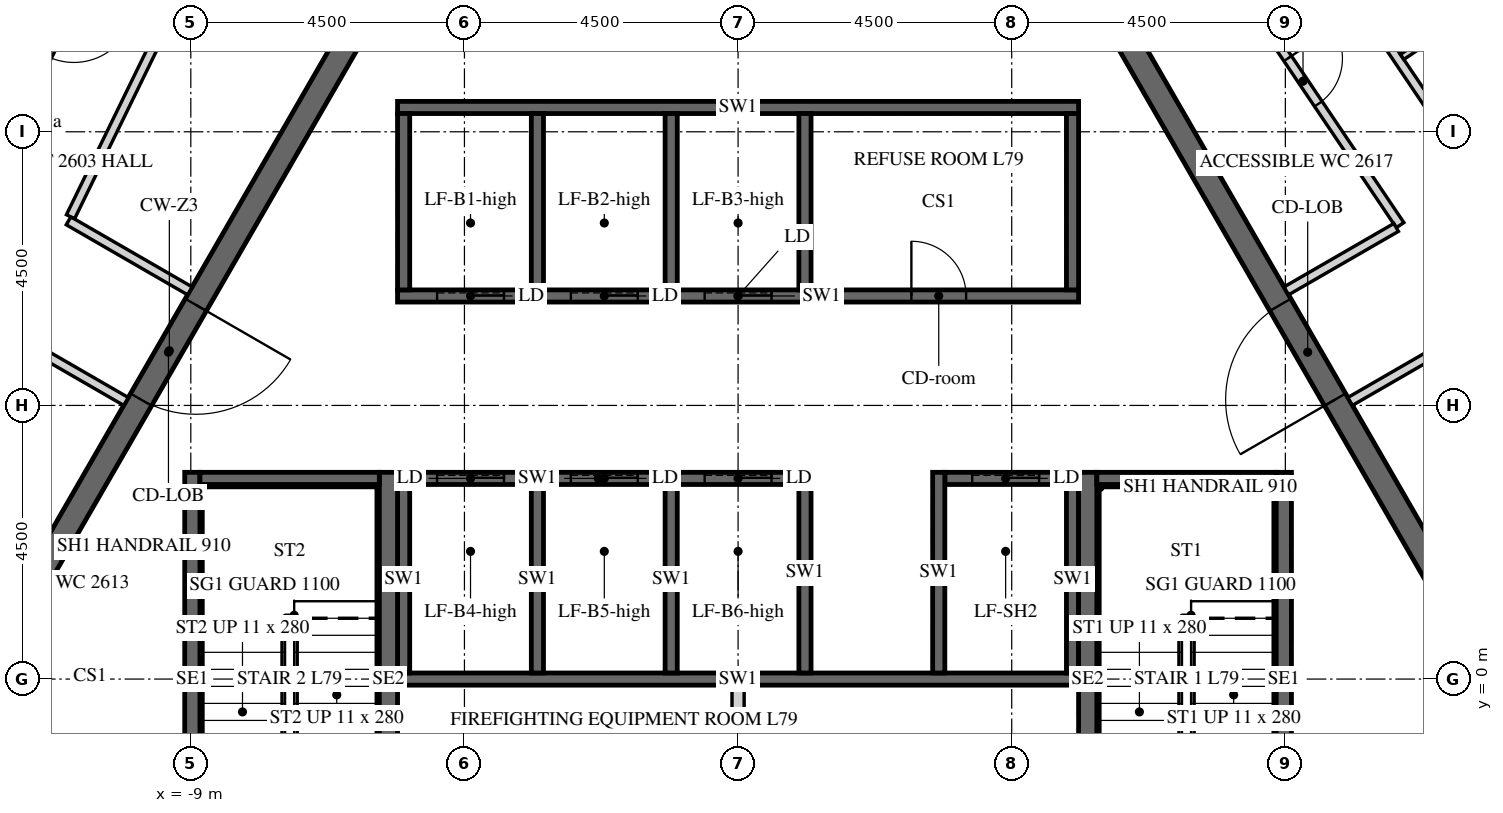
"""IFC4 building model, lengths in metres.
Left out: names, types, materials, properties, quantities, classifications, styles, units other than length and angle.
Written with IfcOpenShell. Run it as: python <this file> out.ifc"""

import sys

from ifc_helpers import new_model, si_unit, direction, frame, frame_2d, origin, place, context, subcontext, project, spatial, polyline, rectangle, outline, extrude, element, fill, save


model = new_model("IFC4")
c1 = context("Model", 3, precision=1e-05, world=origin(), true_north=direction((0.0, 1.0)))
c2 = subcontext(c1, "Body", "Model", "MODEL_VIEW")
j1 = project(units=[si_unit("LENGTHUNIT", "METRE"), si_unit("PLANEANGLEUNIT", "RADIAN")], contexts=[c1])
p1 = place(None, origin())
s1 = spatial("IfcSite", under=j1, at=p1, CompositionType="ELEMENT")
p2 = place(p1, origin())
s2 = spatial("IfcBuilding", under=s1, at=p2, CompositionType="ELEMENT")
p3 = place(p2, frame((0.0, 0.0, 326.4)))
s3 = spatial("IfcBuildingStorey", under=s2, at=p3, CompositionType="ELEMENT", Elevation=326.4)
p4 = place(p3, frame((-6.235, 10.8, -0.15), z_axis=(0.0, 0.0, 1.0), x_axis=(-0.499996419489, -0.866027470984, 0.0)))
e1 = element("IfcWall", 1, at=p4, inside=s3, PredefinedType="SHEAR", context=c2, shape_type="SweptSolid", body=[
    extrude(outline(polyline([(-0.115, -0.2), (12.586, -0.2), (12.355, 0.2), (0.115, 0.2), (-0.115, -0.2)])), origin(), (0.0, 0.0, 1.0), 3.9),
])
p5 = place(p4, frame((5.364, 0.0, 0.15)))
e2 = element("IfcOpeningElement", 2, at=p5, cuts=e1, PredefinedType="OPENING", context=c2, shape_type="SweptSolid", body=[
    extrude(rectangle(XDim=1.8, YDim=2.4, at=frame_2d((0.9, 1.2))), frame((0.0, 0.21, 0.0), z_axis=(0.0, -1.0, 0.0), x_axis=(1.0, 0.0, 0.0)), (0.0, 0.0, 1.0), 0.42),
])
p6 = place(p3, frame((-12.471, 0.0, -0.15), z_axis=(0.0, 0.0, 1.0), x_axis=(0.499996419489, -0.866027470984, 0.0)))
e3 = element("IfcWall", 3, at=p6, inside=s3, PredefinedType="SHEAR", context=c2, shape_type="SweptSolid", body=[
    extrude(outline(polyline([(-0.115, -0.2), (12.586, -0.2), (12.355, 0.2), (0.115, 0.2), (-0.115, -0.2)])), origin(), (0.0, 0.0, 1.0), 3.9),
])
p7 = place(p6, frame((5.306, 0.0, 0.15)))
e4 = element("IfcOpeningElement", 4, at=p7, cuts=e3, PredefinedType="OPENING", context=c2, shape_type="SweptSolid", body=[
    extrude(rectangle(XDim=1.8, YDim=2.4, at=frame_2d((0.9, 1.2))), frame((0.0, 0.21, 0.0), z_axis=(0.0, -1.0, 0.0), x_axis=(1.0, 0.0, 0.0)), (0.0, 0.0, 1.0), 0.42),
])
p8 = place(p3, frame((6.235, -10.8, -0.15), z_axis=(0.0, 0.0, 1.0), x_axis=(0.499996419489, 0.866027470984, 0.0)))
e5 = element("IfcWall", 5, at=p8, inside=s3, PredefinedType="SHEAR", context=c2, shape_type="SweptSolid", body=[
    extrude(outline(polyline([(-0.115, -0.2), (12.586, -0.2), (12.355, 0.2), (0.115, 0.2), (-0.115, -0.2)])), origin(), (0.0, 0.0, 1.0), 3.9),
])
p9 = place(p8, frame((5.364, 0.0, 0.15)))
e6 = element("IfcOpeningElement", 6, at=p9, cuts=e5, PredefinedType="OPENING", context=c2, shape_type="SweptSolid", body=[
    extrude(rectangle(XDim=1.8, YDim=2.4, at=frame_2d((0.9, 1.2))), frame((0.0, 0.21, 0.0), z_axis=(0.0, -1.0, 0.0), x_axis=(1.0, 0.0, 0.0)), (0.0, 0.0, 1.0), 0.42),
])
p10 = place(p3, frame((12.471, 0.0, -0.15), z_axis=(0.0, 0.0, 1.0), x_axis=(-0.499996419489, 0.866027470984, 0.0)))
e7 = element("IfcWall", 7, at=p10, inside=s3, PredefinedType="SHEAR", context=c2, shape_type="SweptSolid", body=[
    extrude(outline(polyline([(-0.115, -0.2), (12.586, -0.2), (12.355, 0.2), (0.115, 0.2), (-0.115, -0.2)])), origin(), (0.0, 0.0, 1.0), 3.9),
])
p11 = place(p10, frame((5.306, 0.0, 0.15)))
e8 = element("IfcOpeningElement", 8, at=p11, cuts=e7, PredefinedType="OPENING", context=c2, shape_type="SweptSolid", body=[
    extrude(rectangle(XDim=1.8, YDim=2.4, at=frame_2d((0.9, 1.2))), frame((0.0, 0.21, 0.0), z_axis=(0.0, -1.0, 0.0), x_axis=(1.0, 0.0, 0.0)), (0.0, 0.0, 1.0), 0.42),
])
p12 = place(p3, frame((-5.6, 6.3, -0.25), z_axis=(0.0, 0.0, 1.0), x_axis=(1.0, 0.0, 0.0)))
e9 = element("IfcWall", 9, at=p12, inside=s3, PredefinedType="SHEAR", context=c2, shape_type="SweptSolid", body=[
    extrude(rectangle(XDim=11.2, YDim=0.2, at=frame_2d((5.6, 0.0))), origin(), (0.0, 0.0, 1.0), 3.9),
])
p13 = place(p12, frame((8.45, 0.0, 0.25)))
e10 = element("IfcOpeningElement", 10, at=p13, cuts=e9, PredefinedType="OPENING", context=c2, shape_type="SweptSolid", body=[
    extrude(rectangle(XDim=0.9, YDim=2.1, at=frame_2d((0.45, 1.05))), frame((0.0, 0.11, 0.0), z_axis=(0.0, -1.0, 0.0), x_axis=(1.0, 0.0, 0.0)), (0.0, 0.0, 1.0), 0.22),
])
p14 = place(p12, frame((0.65, 0.0, 0.25)))
e11 = element("IfcOpeningElement", 11, at=p14, cuts=e9, PredefinedType="OPENING", context=c2, shape_type="SweptSolid", body=[
    extrude(rectangle(XDim=1.1, YDim=2.1, at=frame_2d((0.55, 1.05))), frame((0.0, 0.11, 0.0), z_axis=(0.0, -1.0, 0.0), x_axis=(1.0, 0.0, 0.0)), (0.0, 0.0, 1.0), 0.22),
])
p15 = place(p12, frame((2.85, 0.0, 0.25)))
e12 = element("IfcOpeningElement", 12, at=p15, cuts=e9, PredefinedType="OPENING", context=c2, shape_type="SweptSolid", body=[
    extrude(rectangle(XDim=1.1, YDim=2.1, at=frame_2d((0.55, 1.05))), frame((0.0, 0.11, 0.0), z_axis=(0.0, -1.0, 0.0), x_axis=(1.0, 0.0, 0.0)), (0.0, 0.0, 1.0), 0.22),
])
p16 = place(p12, frame((5.05, 0.0, 0.25)))
e13 = element("IfcOpeningElement", 13, at=p16, cuts=e9, PredefinedType="OPENING", context=c2, shape_type="SweptSolid", body=[
    extrude(rectangle(XDim=1.1, YDim=2.1, at=frame_2d((0.55, 1.05))), frame((0.0, 0.11, 0.0), z_axis=(0.0, -1.0, 0.0), x_axis=(1.0, 0.0, 0.0)), (0.0, 0.0, 1.0), 0.22),
])
p17 = place(p3, frame((-5.6, 9.4, -0.25), z_axis=(0.0, 0.0, 1.0), x_axis=(1.0, 0.0, 0.0)))
e14 = element("IfcWall", 14, at=p17, inside=s3, PredefinedType="SHEAR", context=c2, shape_type="SweptSolid", body=[
    extrude(rectangle(XDim=11.2, YDim=0.2, at=frame_2d((5.6, 0.0))), origin(), (0.0, 0.0, 1.0), 3.9),
])
for number, where, z_axis, x_axis in (
    (15, (-5.5, 6.4, -0.25), (0.0, 0.0, 1.0), (0.0, 1.0, 0.0)),
    (16, (-3.3, 6.4, -0.25), (0.0, 0.0, 1.0), (0.0, 1.0, 0.0)),
    (17, (-1.1, 6.4, -0.25), (0.0, 0.0, 1.0), (0.0, 1.0, 0.0)),
    (18, (1.1, 6.4, -0.25), (0.0, 0.0, 1.0), (0.0, 1.0, 0.0)),
    (19, (5.5, 6.4, -0.25), (0.0, 0.0, 1.0), (0.0, 1.0, 0.0)),
):
    element("IfcWall", number, at=place(p3, frame(where, z_axis=z_axis, x_axis=x_axis)), inside=s3, PredefinedType="SHEAR", context=c2, shape_type="SweptSolid", body=[
        extrude(rectangle(XDim=2.9, YDim=0.2, at=frame_2d((1.45, 0.0))), origin(), (0.0, 0.0, 1.0), 3.9),
    ])
p18 = place(p3, frame((-5.6, 3.3, -0.25), z_axis=(0.0, 0.0, 1.0), x_axis=(1.0, 0.0, 0.0)))
e20 = element("IfcWall", 20, at=p18, inside=s3, PredefinedType="SHEAR", context=c2, shape_type="SweptSolid", body=[
    extrude(rectangle(XDim=6.6, YDim=0.2, at=frame_2d((3.3, 0.0))), origin(), (0.0, 0.0, 1.0), 3.9),
])
p19 = place(p18, frame((0.65, 0.0, 0.25)))
e21 = element("IfcOpeningElement", 21, at=p19, cuts=e20, PredefinedType="OPENING", context=c2, shape_type="SweptSolid", body=[
    extrude(rectangle(XDim=1.1, YDim=2.1, at=frame_2d((0.55, 1.05))), frame((0.0, 0.11, 0.0), z_axis=(0.0, -1.0, 0.0), x_axis=(1.0, 0.0, 0.0)), (0.0, 0.0, 1.0), 0.22),
])
p20 = place(p18, frame((2.85, 0.0, 0.25)))
e22 = element("IfcOpeningElement", 22, at=p20, cuts=e20, PredefinedType="OPENING", context=c2, shape_type="SweptSolid", body=[
    extrude(rectangle(XDim=1.1, YDim=2.1, at=frame_2d((0.55, 1.05))), frame((0.0, 0.11, 0.0), z_axis=(0.0, -1.0, 0.0), x_axis=(1.0, 0.0, 0.0)), (0.0, 0.0, 1.0), 0.22),
])
p21 = place(p18, frame((5.05, 0.0, 0.25)))
e23 = element("IfcOpeningElement", 23, at=p21, cuts=e20, PredefinedType="OPENING", context=c2, shape_type="SweptSolid", body=[
    extrude(rectangle(XDim=1.1, YDim=2.1, at=frame_2d((0.55, 1.05))), frame((0.0, 0.11, 0.0), z_axis=(0.0, -1.0, 0.0), x_axis=(1.0, 0.0, 0.0)), (0.0, 0.0, 1.0), 0.22),
])
p22 = place(p3, frame((3.4, 3.3, -0.25), z_axis=(0.0, 0.0, 1.0), x_axis=(1.0, 0.0, 0.0)))
e24 = element("IfcWall", 24, at=p22, inside=s3, PredefinedType="SHEAR", context=c2, shape_type="SweptSolid", body=[
    extrude(rectangle(XDim=2.2, YDim=0.2, at=frame_2d((1.1, 0.0))), origin(), (0.0, 0.0, 1.0), 3.9),
])
p23 = place(p22, frame((0.45, 0.0, 0.25)))
e25 = element("IfcOpeningElement", 25, at=p23, cuts=e24, PredefinedType="OPENING", context=c2, shape_type="SweptSolid", body=[
    extrude(rectangle(XDim=1.1, YDim=2.1, at=frame_2d((0.55, 1.05))), frame((0.0, 0.11, 0.0), z_axis=(0.0, -1.0, 0.0), x_axis=(1.0, 0.0, 0.0)), (0.0, 0.0, 1.0), 0.22),
])
p24 = place(p3, frame((-5.6, 0.0, -0.25), z_axis=(0.0, 0.0, 1.0), x_axis=(1.0, 0.0, 0.0)))
e26 = element("IfcWall", 26, at=p24, inside=s3, PredefinedType="SHEAR", context=c2, shape_type="SweptSolid", body=[
    extrude(rectangle(XDim=11.2, YDim=0.2, at=frame_2d((5.6, 0.0))), origin(), (0.0, 0.0, 1.0), 3.9),
])
for number, where, z_axis, x_axis in (
    (27, (-5.5, 0.1, -0.25), (0.0, 0.0, 1.0), (0.0, 1.0, 0.0)),
    (28, (-3.3, 0.1, -0.25), (0.0, 0.0, 1.0), (0.0, 1.0, 0.0)),
    (29, (-1.1, 0.1, -0.25), (0.0, 0.0, 1.0), (0.0, 1.0, 0.0)),
):
    element("IfcWall", number, at=place(p3, frame(where, z_axis=z_axis, x_axis=x_axis)), inside=s3, PredefinedType="SHEAR", context=c2, shape_type="SweptSolid", body=[
        extrude(rectangle(XDim=3.1, YDim=0.2, at=frame_2d((1.55, 0.0))), origin(), (0.0, 0.0, 1.0), 3.9),
    ])
for number, where, z_axis, x_axis in (
    (30, (1.1, 0.1, -0.25), (0.0, 0.0, 1.0), (0.0, 1.0, 0.0)),
    (31, (3.3, 0.1, -0.25), (0.0, 0.0, 1.0), (0.0, 1.0, 0.0)),
):
    element("IfcWall", number, at=place(p3, frame(where, z_axis=z_axis, x_axis=x_axis)), inside=s3, PredefinedType="SHEAR", context=c2, shape_type="SweptSolid", body=[
        extrude(rectangle(XDim=3.3, YDim=0.2, at=frame_2d((1.65, 0.0))), origin(), (0.0, 0.0, 1.0), 3.9),
    ])
p25 = place(p3, frame((5.5, 0.1, -0.25), z_axis=(0.0, 0.0, 1.0), x_axis=(0.0, 1.0, 0.0)))
e32 = element("IfcWall", 32, at=p25, inside=s3, PredefinedType="SHEAR", context=c2, shape_type="SweptSolid", body=[
    extrude(rectangle(XDim=3.1, YDim=0.2, at=frame_2d((1.55, 0.0))), origin(), (0.0, 0.0, 1.0), 3.9),
])
p26 = place(p3, frame((0.0, -6.2, 0.0), z_axis=(0.0, 0.0, 1.0), x_axis=(0.0, 1.0, 0.0)))
e33 = element("IfcWall", 33, at=p26, inside=s3, PredefinedType="PARTITIONING", context=c2, shape_type="SweptSolid", body=[
    extrude(rectangle(XDim=6.1, YDim=0.2, at=frame_2d((3.05, 0.0))), origin(), (0.0, 0.0, 1.0), 3.65),
])
p27 = place(p3, frame((5.75, -3.4, -0.25), z_axis=(0.0, 0.0, 1.0), x_axis=(0.0, 1.0, 0.0)))
e34 = element("IfcWall", 34, at=p27, inside=s3, PredefinedType="SHEAR", context=c2, shape_type="SweptSolid", body=[
    extrude(rectangle(XDim=6.8, YDim=0.3, at=frame_2d((3.4, 0.0))), origin(), (0.0, 0.0, 1.0), 3.9),
])
p28 = place(p3, frame((8.975, -3.4, -0.25), z_axis=(0.0, 0.0, 1.0), x_axis=(0.0, 1.0, 0.0)))
e35 = element("IfcWall", 35, at=p28, inside=s3, PredefinedType="SHEAR", context=c2, shape_type="SweptSolid", body=[
    extrude(rectangle(XDim=6.8, YDim=0.25, at=frame_2d((3.4, 0.0))), origin(), (0.0, 0.0, 1.0), 3.9),
])
p29 = place(p3, frame((5.9, 3.3, -0.25), z_axis=(0.0, 0.0, 1.0), x_axis=(1.0, 0.0, 0.0)))
e36 = element("IfcWall", 36, at=p29, inside=s3, PredefinedType="SHEAR", context=c2, shape_type="SweptSolid", body=[
    extrude(rectangle(XDim=2.95, YDim=0.2, at=frame_2d((1.475, 0.0))), origin(), (0.0, 0.0, 1.0), 3.9),
])
p30 = place(p3, frame((-5.75, -3.4, -0.25), z_axis=(0.0, 0.0, 1.0), x_axis=(0.0, 1.0, 0.0)))
e37 = element("IfcWall", 37, at=p30, inside=s3, PredefinedType="SHEAR", context=c2, shape_type="SweptSolid", body=[
    extrude(rectangle(XDim=6.8, YDim=0.3, at=frame_2d((3.4, 0.0))), origin(), (0.0, 0.0, 1.0), 3.9),
])
p31 = place(p3, frame((-8.975, -3.4, -0.25), z_axis=(0.0, 0.0, 1.0), x_axis=(0.0, 1.0, 0.0)))
e38 = element("IfcWall", 38, at=p31, inside=s3, PredefinedType="SHEAR", context=c2, shape_type="SweptSolid", body=[
    extrude(rectangle(XDim=6.8, YDim=0.25, at=frame_2d((3.4, 0.0))), origin(), (0.0, 0.0, 1.0), 3.9),
])
p32 = place(p3, frame((-8.85, 3.3, -0.25), z_axis=(0.0, 0.0, 1.0), x_axis=(1.0, 0.0, 0.0)))
e39 = element("IfcWall", 39, at=p32, inside=s3, PredefinedType="SHEAR", context=c2, shape_type="SweptSolid", body=[
    extrude(rectangle(XDim=2.95, YDim=0.2, at=frame_2d((1.475, 0.0))), origin(), (0.0, 0.0, 1.0), 3.9),
])
p33 = place(p3, frame((-8.247, 16.625, 0.0), z_axis=(0.0, 0.0, 1.0), x_axis=(-0.438376416131, -0.89879147625, 0.0)))
e40 = element("IfcWall", 40, at=p33, inside=s3, PredefinedType="PARTITIONING", context=c2, shape_type="SweptSolid", body=[
    extrude(rectangle(XDim=16.606, YDim=0.15, at=frame_2d((8.303, 0.0))), origin(), (0.0, 0.0, 1.0), 2.838),
])
p34 = place(p33, frame((6.103, 0.0, 0.0)))
e41 = element("IfcOpeningElement", 41, at=p34, cuts=e40, PredefinedType="OPENING", context=c2, shape_type="SweptSolid", body=[
    extrude(rectangle(XDim=1.0, YDim=2.1, at=frame_2d((0.5, 1.05))), frame((0.0, 0.085, 0.0), z_axis=(0.0, -1.0, 0.0), x_axis=(1.0, 0.0, 0.0)), (0.0, 0.0, 1.0), 0.17),
])
p35 = place(p3, frame((-9.016, 6.384, 0.0), z_axis=(0.0, 0.0, 1.0), x_axis=(-0.866030286288, 0.49999154316, 0.0)))
e42 = element("IfcWall", 42, at=p35, inside=s3, PredefinedType="PARTITIONING", context=c2, shape_type="SweptSolid", body=[
    extrude(rectangle(XDim=2.304, YDim=0.15, at=frame_2d((1.152, 0.0))), origin(), (0.0, 0.0, 1.0), 2.838),
])
p36 = place(p3, frame((-10.978, 7.604, 0.0), z_axis=(0.0, 0.0, 1.0), x_axis=(0.43838720727, 0.898786212902, 0.0)))
e43 = element("IfcWall", 43, at=p36, inside=s3, PredefinedType="PARTITIONING", context=c2, shape_type="SweptSolid", body=[
    extrude(rectangle(XDim=8.452, YDim=0.15, at=frame_2d((4.226, 0.0))), origin(), (0.0, 0.0, 1.0), 2.838),
])
p37 = place(p3, frame((-11.868, 5.606, 0.0), z_axis=(0.0, 0.0, 1.0), x_axis=(0.866033244403, -0.499986419405, 0.0)))
e44 = element("IfcWall", 44, at=p37, inside=s3, PredefinedType="PARTITIONING", context=c2, shape_type="SweptSolid", body=[
    extrude(rectangle(XDim=2.082, YDim=0.15, at=frame_2d((1.041, 0.0))), origin(), (0.0, 0.0, 1.0), 2.838),
])
p38 = place(p3, frame((18.521, -1.171, 0.0), z_axis=(0.0, 0.0, 1.0), x_axis=(-0.559191021435, 0.829038842001, 0.0)))
e45 = element("IfcWall", 45, at=p38, inside=s3, PredefinedType="PARTITIONING", context=c2, shape_type="SweptSolid", body=[
    extrude(rectangle(XDim=16.605, YDim=0.15, at=frame_2d((8.303, 0.0))), origin(), (0.0, 0.0, 1.0), 2.838),
])
p39 = place(p38, frame((9.703, 0.0, 0.0)))
e46 = element("IfcOpeningElement", 46, at=p39, cuts=e45, PredefinedType="OPENING", context=c2, shape_type="SweptSolid", body=[
    extrude(rectangle(XDim=1.0, YDim=2.1, at=frame_2d((0.5, 1.05))), frame((0.0, 0.085, 0.0), z_axis=(0.0, -1.0, 0.0), x_axis=(1.0, 0.0, 0.0)), (0.0, 0.0, 1.0), 0.17),
])
p40 = place(p3, frame((10.066, 4.566, 0.0), z_axis=(0.0, 0.0, 1.0), x_axis=(0.866034075723, 0.499984979461, 0.0)))
e47 = element("IfcWall", 47, at=p40, inside=s3, PredefinedType="PARTITIONING", context=c2, shape_type="SweptSolid", body=[
    extrude(rectangle(XDim=2.308, YDim=0.15, at=frame_2d((1.154, 0.0))), origin(), (0.0, 0.0, 1.0), 2.838),
])
p41 = place(p3, frame((7.694, 12.199, 0.0), z_axis=(0.0, 0.0, 1.0), x_axis=(0.55920112739, -0.829032025392, 0.0)))
e48 = element("IfcWall", 48, at=p41, inside=s3, PredefinedType="PARTITIONING", context=c2, shape_type="SweptSolid", body=[
    extrude(rectangle(XDim=5.71, YDim=0.15, at=frame_2d((2.855, 0.0))), origin(), (0.0, 0.0, 1.0), 2.838),
])
p42 = place(p41, frame((2.405, 0.0, 0.0)))
e49 = element("IfcOpeningElement", 49, at=p42, cuts=e48, PredefinedType="OPENING", context=c2, shape_type="SweptSolid", body=[
    extrude(rectangle(XDim=0.9, YDim=2.1, at=frame_2d((0.45, 1.05))), frame((0.0, 0.085, 0.0), z_axis=(0.0, -1.0, 0.0), x_axis=(1.0, 0.0, 0.0)), (0.0, 0.0, 1.0), 0.17),
])
p43 = place(p3, frame((10.822, 7.427, 0.0), z_axis=(0.0, 0.0, 1.0), x_axis=(-0.866016009309, -0.500016271356, 0.0)))
e50 = element("IfcWall", 50, at=p43, inside=s3, PredefinedType="PARTITIONING", context=c2, shape_type="SweptSolid", body=[
    extrude(rectangle(XDim=2.086, YDim=0.15, at=frame_2d((1.043, 0.0))), origin(), (0.0, 0.0, 1.0), 2.838),
])
p44 = place(p3, frame((10.921, 10.231, 0.0), z_axis=(0.0, 0.0, 1.0), x_axis=(0.829010378124, 0.559233218759, 0.0)))
e51 = element("IfcWall", 51, at=p44, inside=s3, PredefinedType="PARTITIONING", context=c2, shape_type="SweptSolid", body=[
    extrude(rectangle(XDim=3.325, YDim=0.1, at=frame_2d((1.663, 0.0))), origin(), (0.0, 0.0, 1.0), 2.838),
])
p45 = place(p5, origin())
e52 = element("IfcDoor", 52, at=p45, inside=s3, OperationType="DOUBLE_DOOR_SINGLE_SWING", PredefinedType="DOOR", context=c2, shape_type="SweptSolid", body=[
    extrude(rectangle(XDim=1.8, YDim=2.4, at=frame_2d((0.9, 1.2))), frame((0.0, 0.025, 0.0), z_axis=(0.0, -1.0, 0.0), x_axis=(1.0, 0.0, 0.0)), (0.0, 0.0, 1.0), 0.05),
])
fill(e2, e52)
p46 = place(p11, origin())
e53 = element("IfcDoor", 53, at=p46, inside=s3, OperationType="DOUBLE_DOOR_SINGLE_SWING", PredefinedType="DOOR", context=c2, shape_type="SweptSolid", body=[
    extrude(rectangle(XDim=1.8, YDim=2.4, at=frame_2d((0.9, 1.2))), frame((0.0, 0.025, 0.0), z_axis=(0.0, -1.0, 0.0), x_axis=(1.0, 0.0, 0.0)), (0.0, 0.0, 1.0), 0.05),
])
fill(e8, e53)
p47 = place(p13, origin())
e54 = element("IfcDoor", 54, at=p47, inside=s3, OperationType="SINGLE_SWING_LEFT", PredefinedType="DOOR", context=c2, shape_type="SweptSolid", body=[
    extrude(rectangle(XDim=0.9, YDim=2.1, at=frame_2d((0.45, 1.05))), frame((0.0, 0.025, 0.0), z_axis=(0.0, -1.0, 0.0), x_axis=(1.0, 0.0, 0.0)), (0.0, 0.0, 1.0), 0.05),
])
fill(e10, e54)
p48 = place(p14, origin())
e55 = element("IfcDoor", 55, at=p48, inside=s3, OperationType="SLIDING_TO_LEFT", PredefinedType="DOOR", context=c2, shape_type="SweptSolid", body=[
    extrude(rectangle(XDim=1.1, YDim=2.1, at=frame_2d((0.55, 1.05))), frame((0.0, 0.025, 0.0), z_axis=(0.0, -1.0, 0.0), x_axis=(1.0, 0.0, 0.0)), (0.0, 0.0, 1.0), 0.05),
])
fill(e11, e55)
p49 = place(p15, origin())
e56 = element("IfcDoor", 56, at=p49, inside=s3, OperationType="SLIDING_TO_LEFT", PredefinedType="DOOR", context=c2, shape_type="SweptSolid", body=[
    extrude(rectangle(XDim=1.1, YDim=2.1, at=frame_2d((0.55, 1.05))), frame((0.0, 0.025, 0.0), z_axis=(0.0, -1.0, 0.0), x_axis=(1.0, 0.0, 0.0)), (0.0, 0.0, 1.0), 0.05),
])
fill(e12, e56)
p50 = place(p16, origin())
e57 = element("IfcDoor", 57, at=p50, inside=s3, OperationType="SLIDING_TO_LEFT", PredefinedType="DOOR", context=c2, shape_type="SweptSolid", body=[
    extrude(rectangle(XDim=1.1, YDim=2.1, at=frame_2d((0.55, 1.05))), frame((0.0, 0.025, 0.0), z_axis=(0.0, -1.0, 0.0), x_axis=(1.0, 0.0, 0.0)), (0.0, 0.0, 1.0), 0.05),
])
fill(e13, e57)
p51 = place(p19, origin())
e58 = element("IfcDoor", 58, at=p51, inside=s3, OperationType="SLIDING_TO_LEFT", PredefinedType="DOOR", context=c2, shape_type="SweptSolid", body=[
    extrude(rectangle(XDim=1.1, YDim=2.1, at=frame_2d((0.55, 1.05))), frame((0.0, 0.025, 0.0), z_axis=(0.0, -1.0, 0.0), x_axis=(1.0, 0.0, 0.0)), (0.0, 0.0, 1.0), 0.05),
])
fill(e21, e58)
p52 = place(p20, origin())
e59 = element("IfcDoor", 59, at=p52, inside=s3, OperationType="SLIDING_TO_LEFT", PredefinedType="DOOR", context=c2, shape_type="SweptSolid", body=[
    extrude(rectangle(XDim=1.1, YDim=2.1, at=frame_2d((0.55, 1.05))), frame((0.0, 0.025, 0.0), z_axis=(0.0, -1.0, 0.0), x_axis=(1.0, 0.0, 0.0)), (0.0, 0.0, 1.0), 0.05),
])
fill(e22, e59)
p53 = place(p21, origin())
e60 = element("IfcDoor", 60, at=p53, inside=s3, OperationType="SLIDING_TO_LEFT", PredefinedType="DOOR", context=c2, shape_type="SweptSolid", body=[
    extrude(rectangle(XDim=1.1, YDim=2.1, at=frame_2d((0.55, 1.05))), frame((0.0, 0.025, 0.0), z_axis=(0.0, -1.0, 0.0), x_axis=(1.0, 0.0, 0.0)), (0.0, 0.0, 1.0), 0.05),
])
fill(e23, e60)
p54 = place(p23, origin())
e61 = element("IfcDoor", 61, at=p54, inside=s3, OperationType="SLIDING_TO_LEFT", PredefinedType="DOOR", context=c2, shape_type="SweptSolid", body=[
    extrude(rectangle(XDim=1.1, YDim=2.1, at=frame_2d((0.55, 1.05))), frame((0.0, 0.025, 0.0), z_axis=(0.0, -1.0, 0.0), x_axis=(1.0, 0.0, 0.0)), (0.0, 0.0, 1.0), 0.05),
])
fill(e25, e61)
p55 = place(p34, origin())
e62 = element("IfcDoor", 62, at=p55, inside=s3, OperationType="SINGLE_SWING_LEFT", PredefinedType="DOOR", context=c2, shape_type="SweptSolid", body=[
    extrude(rectangle(XDim=1.0, YDim=2.1, at=frame_2d((0.5, 1.05))), frame((0.0, 0.025, 0.0), z_axis=(0.0, -1.0, 0.0), x_axis=(1.0, 0.0, 0.0)), (0.0, 0.0, 1.0), 0.05),
])
fill(e41, e62)
p56 = place(p42, origin())
e63 = element("IfcDoor", 63, at=p56, inside=s3, OperationType="SINGLE_SWING_RIGHT", PredefinedType="DOOR", context=c2, shape_type="SweptSolid", body=[
    extrude(rectangle(XDim=0.9, YDim=2.1, at=frame_2d((0.45, 1.05))), frame((0.0, 0.025, 0.0), z_axis=(0.0, -1.0, 0.0), x_axis=(1.0, 0.0, 0.0)), (0.0, 0.0, 1.0), 0.05),
])
fill(e49, e63)
save(model, sys.argv[1])
